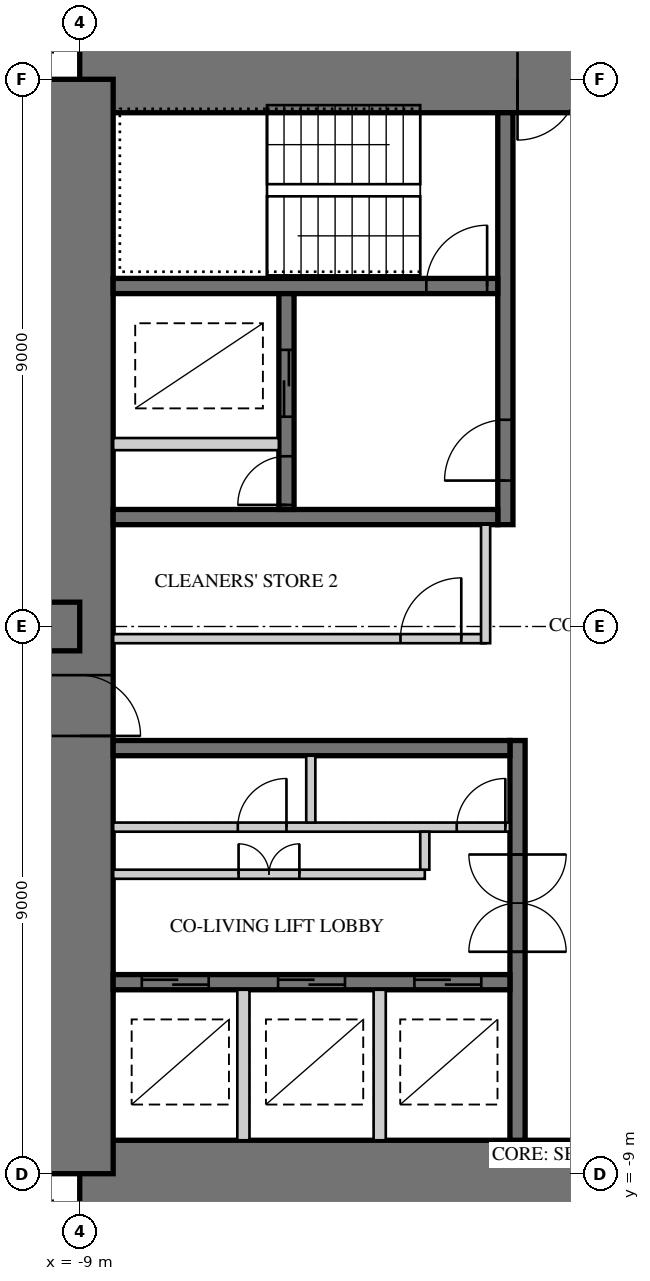
"""IFC4 building model, lengths in metres.
Left out: names, types, materials, properties, quantities, classifications, styles, units other than length and angle.
Written with IfcOpenShell. Run it as: python <this file> out.ifc"""

import sys

from ifc_helpers import new_model, si_unit, direction, frame, frame_2d, origin, place, context, subcontext, project, spatial, rectangle, extrude, element, fill, save


model = new_model("IFC4")
c1 = context("Model", 3, precision=1e-05, world=origin(), true_north=direction((0.0, 1.0)))
c2 = subcontext(c1, "Body", "Model", "MODEL_VIEW")
j1 = project(units=[si_unit("LENGTHUNIT", "METRE"), si_unit("PLANEANGLEUNIT", "RADIAN")], contexts=[c1])
p1 = place(None, origin())
s1 = spatial("IfcSite", under=j1, at=p1, CompositionType="ELEMENT")
p2 = place(p1, origin())
s2 = spatial("IfcBuilding", under=s1, at=p2, CompositionType="ELEMENT")
p3 = place(p2, frame((0.0, 0.0, 172.9)))
s3 = spatial("IfcBuildingStorey", under=s2, at=p3, CompositionType="ELEMENT", Elevation=172.9)
p4 = place(p3, frame((9.0, 9.0, 0.0), z_axis=(0.0, 0.0, 1.0), x_axis=(-1.0, 0.0, 0.0)))
e1 = element("IfcWall", 1, at=p4, inside=s3, PredefinedType="SHEAR", context=c2, shape_type="SweptSolid", body=[
    extrude(rectangle(XDim=18.0, YDim=1.1, at=frame_2d((9.0, 0.0))), origin(), (0.0, 0.0, 1.0), 3.4),
])
p5 = place(p4, frame((9.8, 0.0, 0.0)))
e2 = element("IfcOpeningElement", 2, at=p5, cuts=e1, PredefinedType="OPENING", context=c2, shape_type="SweptSolid", body=[
    extrude(rectangle(XDim=1.0, YDim=2.4, at=frame_2d((0.5, 1.2))), frame((0.0, 0.56, 0.0), z_axis=(0.0, -1.0, 0.0), x_axis=(1.0, 0.0, 0.0)), (0.0, 0.0, 1.0), 1.12),
])
p6 = place(p3, frame((-9.0, -9.0, 0.0), z_axis=(0.0, 0.0, 1.0), x_axis=(1.0, 0.0, 0.0)))
e3 = element("IfcWall", 3, at=p6, inside=s3, PredefinedType="SHEAR", context=c2, shape_type="SweptSolid", body=[
    extrude(rectangle(XDim=18.0, YDim=1.1, at=frame_2d((9.0, 0.0))), origin(), (0.0, 0.0, 1.0), 3.4),
])
p7 = place(p6, frame((9.8, 0.0, 0.0)))
e4 = element("IfcOpeningElement", 4, at=p7, cuts=e3, PredefinedType="OPENING", context=c2, shape_type="SweptSolid", body=[
    extrude(rectangle(XDim=1.0, YDim=2.4, at=frame_2d((0.5, 1.2))), frame((0.0, 0.56, 0.0), z_axis=(0.0, -1.0, 0.0), x_axis=(1.0, 0.0, 0.0)), (0.0, 0.0, 1.0), 1.12),
])
p8 = place(p3, frame((-9.0, 9.0, 0.0), z_axis=(0.0, 0.0, 1.0), x_axis=(0.0, -1.0, 0.0)))
e5 = element("IfcWall", 5, at=p8, inside=s3, PredefinedType="SHEAR", context=c2, shape_type="SweptSolid", body=[
    extrude(rectangle(XDim=18.0, YDim=1.1, at=frame_2d((9.0, 0.0))), origin(), (0.0, 0.0, 1.0), 3.4),
])
p9 = place(p8, frame((9.8, 0.0, 0.0)))
e6 = element("IfcOpeningElement", 6, at=p9, cuts=e5, PredefinedType="OPENING", context=c2, shape_type="SweptSolid", body=[
    extrude(rectangle(XDim=1.0, YDim=2.4, at=frame_2d((0.5, 1.2))), frame((0.0, 0.56, 0.0), z_axis=(0.0, -1.0, 0.0), x_axis=(1.0, 0.0, 0.0)), (0.0, 0.0, 1.0), 1.12),
])
p10 = place(p3, frame((-2.0, 1.675, 0.0), z_axis=(0.0, 0.0, 1.0), x_axis=(0.0, 1.0, 0.0)))
e7 = element("IfcWall", 7, at=p10, inside=s3, PredefinedType="SHEAR", context=c2, shape_type="SweptSolid", body=[
    extrude(rectangle(XDim=6.775, YDim=0.25, at=frame_2d((3.387, 0.0))), origin(), (0.0, 0.0, 1.0), 3.4),
])
p11 = place(p10, frame((0.725, 0.0, 0.0)))
e8 = element("IfcOpeningElement", 8, at=p11, cuts=e7, PredefinedType="OPENING", context=c2, shape_type="SweptSolid", body=[
    extrude(rectangle(XDim=1.0, YDim=2.1, at=frame_2d((0.5, 1.05))), frame((0.0, 0.135, 0.0), z_axis=(0.0, -1.0, 0.0), x_axis=(1.0, 0.0, 0.0)), (0.0, 0.0, 1.0), 0.27),
])
p12 = place(p3, frame((-2.125, 1.8, 0.0), z_axis=(0.0, 0.0, 1.0), x_axis=(-1.0, 0.0, 0.0)))
e9 = element("IfcWall", 9, at=p12, inside=s3, PredefinedType="SHEAR", context=c2, shape_type="SweptSolid", body=[
    extrude(rectangle(XDim=6.325, YDim=0.25, at=frame_2d((3.163, 0.0))), origin(), (0.0, 0.0, 1.0), 3.4),
])
p13 = place(p3, frame((-2.125, 5.6, 0.0), z_axis=(0.0, 0.0, 1.0), x_axis=(-1.0, 0.0, 0.0)))
e10 = element("IfcWall", 10, at=p13, inside=s3, PredefinedType="SHEAR", context=c2, shape_type="SweptSolid", body=[
    extrude(rectangle(XDim=6.325, YDim=0.25, at=frame_2d((3.163, 0.0))), origin(), (0.0, 0.0, 1.0), 3.4),
])
p14 = place(p13, frame((0.175, 0.0, 0.0)))
e11 = element("IfcOpeningElement", 11, at=p14, cuts=e10, PredefinedType="OPENING", context=c2, shape_type="SweptSolid", body=[
    extrude(rectangle(XDim=1.0, YDim=2.1, at=frame_2d((0.5, 1.05))), frame((0.0, 0.135, 0.0), z_axis=(0.0, -1.0, 0.0), x_axis=(1.0, 0.0, 0.0)), (0.0, 0.0, 1.0), 0.27),
])
p15 = place(p3, frame((-5.6, 1.925, 0.0), z_axis=(0.0, 0.0, 1.0), x_axis=(0.0, 1.0, 0.0)))
e12 = element("IfcWall", 12, at=p15, inside=s3, PredefinedType="SHEAR", context=c2, shape_type="SweptSolid", body=[
    extrude(rectangle(XDim=3.55, YDim=0.25, at=frame_2d((1.775, 0.0))), origin(), (0.0, 0.0, 1.0), 3.4),
])
p16 = place(p15, frame((1.525, 0.0, 0.0)))
e13 = element("IfcOpeningElement", 13, at=p16, cuts=e12, PredefinedType="OPENING", context=c2, shape_type="SweptSolid", body=[
    extrude(rectangle(XDim=1.1, YDim=2.2, at=frame_2d((0.55, 1.1))), frame((0.0, 0.135, 0.0), z_axis=(0.0, -1.0, 0.0), x_axis=(1.0, 0.0, 0.0)), (0.0, 0.0, 1.0), 0.27),
])
p17 = place(p15, frame((0.075, 0.0, 0.0)))
e14 = element("IfcOpeningElement", 14, at=p17, cuts=e12, PredefinedType="OPENING", context=c2, shape_type="SweptSolid", body=[
    extrude(rectangle(XDim=0.8, YDim=2.1, at=frame_2d((0.4, 1.05))), frame((0.0, 0.135, 0.0), z_axis=(0.0, -1.0, 0.0), x_axis=(1.0, 0.0, 0.0)), (0.0, 0.0, 1.0), 0.27),
])
p18 = place(p3, frame((-5.725, 3.0, 0.0), z_axis=(0.0, 0.0, 1.0), x_axis=(-1.0, 0.0, 0.0)))
e15 = element("IfcWall", 15, at=p18, inside=s3, PredefinedType="PARTITIONING", context=c2, shape_type="SweptSolid", body=[
    extrude(rectangle(XDim=2.725, YDim=0.2, at=frame_2d((1.362, 0.0))), origin(), (0.0, 0.0, 1.0), 3.4),
])
p19 = place(p3, frame((-1.8, -1.875, 0.0), z_axis=(0.0, 0.0, 1.0), x_axis=(0.0, -1.0, 0.0)))
e16 = element("IfcWall", 16, at=p19, inside=s3, PredefinedType="SHEAR", context=c2, shape_type="SweptSolid", body=[
    extrude(rectangle(XDim=6.575, YDim=0.25, at=frame_2d((3.288, 0.0))), origin(), (0.0, 0.0, 1.0), 3.4),
])
p20 = place(p19, frame((1.875, 0.0, 0.0)))
e17 = element("IfcOpeningElement", 17, at=p20, cuts=e16, PredefinedType="OPENING", context=c2, shape_type="SweptSolid", body=[
    extrude(rectangle(XDim=1.6, YDim=2.4, at=frame_2d((0.8, 1.2))), frame((0.0, 0.135, 0.0), z_axis=(0.0, -1.0, 0.0), x_axis=(1.0, 0.0, 0.0)), (0.0, 0.0, 1.0), 0.27),
])
p21 = place(p3, frame((-1.925, -2.0, 0.0), z_axis=(0.0, 0.0, 1.0), x_axis=(-1.0, 0.0, 0.0)))
e18 = element("IfcWall", 18, at=p21, inside=s3, PredefinedType="SHEAR", context=c2, shape_type="SweptSolid", body=[
    extrude(rectangle(XDim=6.525, YDim=0.25, at=frame_2d((3.262, 0.0))), origin(), (0.0, 0.0, 1.0), 3.4),
])
p22 = place(p3, frame((-1.925, -5.85, 0.0), z_axis=(0.0, 0.0, 1.0), x_axis=(-1.0, 0.0, 0.0)))
e19 = element("IfcWall", 19, at=p22, inside=s3, PredefinedType="SHEAR", context=c2, shape_type="SweptSolid", body=[
    extrude(rectangle(XDim=6.525, YDim=0.25, at=frame_2d((3.262, 0.0))), origin(), (0.0, 0.0, 1.0), 3.4),
])
p23 = place(p22, frame((0.471, 0.0, 0.0)))
e20 = element("IfcOpeningElement", 20, at=p23, cuts=e19, PredefinedType="OPENING", context=c2, shape_type="SweptSolid", body=[
    extrude(rectangle(XDim=1.1, YDim=2.2, at=frame_2d((0.55, 1.1))), frame((0.0, 0.135, 0.0), z_axis=(0.0, -1.0, 0.0), x_axis=(1.0, 0.0, 0.0)), (0.0, 0.0, 1.0), 0.27),
])
p24 = place(p22, frame((2.712, 0.0, 0.0)))
e21 = element("IfcOpeningElement", 21, at=p24, cuts=e19, PredefinedType="OPENING", context=c2, shape_type="SweptSolid", body=[
    extrude(rectangle(XDim=1.1, YDim=2.2, at=frame_2d((0.55, 1.1))), frame((0.0, 0.135, 0.0), z_axis=(0.0, -1.0, 0.0), x_axis=(1.0, 0.0, 0.0)), (0.0, 0.0, 1.0), 0.27),
])
p25 = place(p22, frame((4.954, 0.0, 0.0)))
e22 = element("IfcOpeningElement", 22, at=p25, cuts=e19, PredefinedType="OPENING", context=c2, shape_type="SweptSolid", body=[
    extrude(rectangle(XDim=1.1, YDim=2.2, at=frame_2d((0.55, 1.1))), frame((0.0, 0.135, 0.0), z_axis=(0.0, -1.0, 0.0), x_axis=(1.0, 0.0, 0.0)), (0.0, 0.0, 1.0), 0.27),
])
p26 = place(p3, frame((-1.925, -3.3, 0.0), z_axis=(0.0, 0.0, 1.0), x_axis=(-1.0, 0.0, 0.0)))
e23 = element("IfcWall", 23, at=p26, inside=s3, PredefinedType="PARTITIONING", context=c2, shape_type="SweptSolid", body=[
    extrude(rectangle(XDim=6.525, YDim=0.15, at=frame_2d((3.262, 0.0))), origin(), (0.0, 0.0, 1.0), 3.4),
])
p27 = place(p26, frame((0.075, 0.0, 0.0)))
e24 = element("IfcOpeningElement", 24, at=p27, cuts=e23, PredefinedType="OPENING", context=c2, shape_type="SweptSolid", body=[
    extrude(rectangle(XDim=0.8, YDim=2.1, at=frame_2d((0.4, 1.05))), frame((0.0, 0.085, 0.0), z_axis=(0.0, -1.0, 0.0), x_axis=(1.0, 0.0, 0.0)), (0.0, 0.0, 1.0), 0.17),
])
p28 = place(p26, frame((3.675, 0.0, 0.0)))
e25 = element("IfcOpeningElement", 25, at=p28, cuts=e23, PredefinedType="OPENING", context=c2, shape_type="SweptSolid", body=[
    extrude(rectangle(XDim=0.8, YDim=2.1, at=frame_2d((0.4, 1.05))), frame((0.0, 0.085, 0.0), z_axis=(0.0, -1.0, 0.0), x_axis=(1.0, 0.0, 0.0)), (0.0, 0.0, 1.0), 0.17),
])
p29 = place(p3, frame((-5.2, -2.125, 0.0), z_axis=(0.0, 0.0, 1.0), x_axis=(0.0, -1.0, 0.0)))
e26 = element("IfcWall", 26, at=p29, inside=s3, PredefinedType="PARTITIONING", context=c2, shape_type="SweptSolid", body=[
    extrude(rectangle(XDim=1.1, YDim=0.15, at=frame_2d((0.55, 0.0))), origin(), (0.0, 0.0, 1.0), 3.4),
])
for number, where, z_axis, x_axis in (
    (27, (-4.067, -5.975, 0.0), (0.0, 0.0, 1.0), (0.0, -1.0, 0.0)),
    (28, (-6.308, -5.975, 0.0), (0.0, 0.0, 1.0), (0.0, -1.0, 0.0)),
):
    element("IfcWall", number, at=place(p3, frame(where, z_axis=z_axis, x_axis=x_axis)), inside=s3, PredefinedType="PARTITIONING", context=c2, shape_type="SweptSolid", body=[
        extrude(rectangle(XDim=2.475, YDim=0.2, at=frame_2d((1.237, 0.0))), origin(), (0.0, 0.0, 1.0), 3.4),
    ])
p30 = place(p3, frame((-9.0, 0.0, 0.0), z_axis=(0.0, 0.0, 1.0), x_axis=(-1.0, 0.0, 0.0)))
e29 = element("IfcWall", 29, at=p30, inside=s3, PredefinedType="SHEAR", context=c2, shape_type="SweptSolid", body=[
    extrude(rectangle(XDim=18.0, YDim=0.8, at=frame_2d((9.0, 0.0))), origin(), (0.0, 0.0, 1.0), 3.4),
])
p31 = place(p30, frame((3.95, 0.0, 0.0)))
e30 = element("IfcOpeningElement", 30, at=p31, cuts=e29, PredefinedType="OPENING", context=c2, shape_type="SweptSolid", body=[
    extrude(rectangle(XDim=1.0, YDim=2.15, at=frame_2d((0.5, 1.075))), frame((0.0, 0.41, 0.0), z_axis=(0.0, -1.0, 0.0), x_axis=(1.0, 0.0, 0.0)), (0.0, 0.0, 1.0), 0.82),
])
p32 = place(p30, frame((6.6, 0.0, 0.0)))
e31 = element("IfcOpeningElement", 31, at=p32, cuts=e29, PredefinedType="OPENING", context=c2, shape_type="SweptSolid", body=[
    extrude(rectangle(XDim=1.0, YDim=2.15, at=frame_2d((0.5, 1.075))), frame((0.0, 0.41, 0.0), z_axis=(0.0, -1.0, 0.0), x_axis=(1.0, 0.0, 0.0)), (0.0, 0.0, 1.0), 0.82),
])
p33 = place(p30, frame((13.25, 0.0, 0.0)))
e32 = element("IfcOpeningElement", 32, at=p33, cuts=e29, PredefinedType="OPENING", context=c2, shape_type="SweptSolid", body=[
    extrude(rectangle(XDim=1.0, YDim=2.2, at=frame_2d((0.5, 1.1))), frame((0.0, 0.41, 0.0), z_axis=(0.0, -1.0, 0.0), x_axis=(1.0, 0.0, 0.0)), (0.0, 0.0, 1.0), 0.82),
])
p34 = place(p3, frame((-9.445, 9.57, 0.0), z_axis=(0.0, 0.0, 1.0), x_axis=(-1.0, 0.0, 0.0)))
e33 = element("IfcWall", 33, at=p34, inside=s3, PredefinedType="SOLIDWALL", context=c2, shape_type="SweptSolid", body=[
    extrude(rectangle(XDim=3.125, YDim=0.25, at=frame_2d((1.562, 0.0))), origin(), (0.0, 0.0, 1.0), 3.22),
])
p35 = place(p34, frame((0.6, 0.0, 0.0)))
e34 = element("IfcOpeningElement", 34, at=p35, cuts=e33, PredefinedType="OPENING", context=c2, shape_type="SweptSolid", body=[
    extrude(rectangle(XDim=1.0, YDim=2.2, at=frame_2d((0.5, 1.1))), frame((0.0, 0.135, 0.0), z_axis=(0.0, -1.0, 0.0), x_axis=(1.0, 0.0, 0.0)), (0.0, 0.0, 1.0), 0.27),
])
p36 = place(p3, frame((-9.57, -9.445, 0.0), z_axis=(0.0, 0.0, 1.0), x_axis=(0.0, -1.0, 0.0)))
e35 = element("IfcWall", 35, at=p36, inside=s3, PredefinedType="SOLIDWALL", context=c2, shape_type="SweptSolid", body=[
    extrude(rectangle(XDim=3.125, YDim=0.25, at=frame_2d((1.562, 0.0))), origin(), (0.0, 0.0, 1.0), 3.22),
])
p37 = place(p36, frame((0.6, 0.0, 0.0)))
e36 = element("IfcOpeningElement", 36, at=p37, cuts=e35, PredefinedType="OPENING", context=c2, shape_type="SweptSolid", body=[
    extrude(rectangle(XDim=1.0, YDim=2.2, at=frame_2d((0.5, 1.1))), frame((0.0, 0.135, 0.0), z_axis=(0.0, -1.0, 0.0), x_axis=(1.0, 0.0, 0.0)), (0.0, 0.0, 1.0), 0.27),
])
p38 = place(p3, frame((-2.325, -0.2, 0.0), z_axis=(0.0, 0.0, 1.0), x_axis=(-1.0, 0.0, 0.0)))
e37 = element("IfcWall", 37, at=p38, inside=s3, PredefinedType="PARTITIONING", context=c2, shape_type="SweptSolid", body=[
    extrude(rectangle(XDim=6.125, YDim=0.15, at=frame_2d((3.062, 0.0))), origin(), (0.0, 0.0, 1.0), 3.22),
])
p39 = place(p38, frame((0.4, 0.0, 0.0)))
e38 = element("IfcOpeningElement", 38, at=p39, cuts=e37, PredefinedType="OPENING", context=c2, shape_type="SweptSolid", body=[
    extrude(rectangle(XDim=1.0, YDim=2.1, at=frame_2d((0.5, 1.05))), frame((0.0, 0.085, 0.0), z_axis=(0.0, -1.0, 0.0), x_axis=(1.0, 0.0, 0.0)), (0.0, 0.0, 1.0), 0.17),
])
p40 = place(p3, frame((-2.325, 1.675, 0.0), z_axis=(0.0, 0.0, 1.0), x_axis=(0.0, -1.0, 0.0)))
e39 = element("IfcWall", 39, at=p40, inside=s3, PredefinedType="PARTITIONING", context=c2, shape_type="SweptSolid", body=[
    extrude(rectangle(XDim=1.95, YDim=0.15, at=frame_2d((0.975, 0.0))), origin(), (0.0, 0.0, 1.0), 3.22),
])
p41 = place(p3, frame((-3.325, -4.075, 0.0), z_axis=(0.0, 0.0, 1.0), x_axis=(-1.0, 0.0, 0.0)))
e40 = element("IfcWall", 40, at=p41, inside=s3, PredefinedType="PARTITIONING", context=c2, shape_type="SweptSolid", body=[
    extrude(rectangle(XDim=5.125, YDim=0.15, at=frame_2d((2.562, 0.0))), origin(), (0.0, 0.0, 1.0), 3.22),
])
p42 = place(p41, frame((2.062, 0.0, 0.0)))
e41 = element("IfcOpeningElement", 41, at=p42, cuts=e40, PredefinedType="OPENING", context=c2, shape_type="SweptSolid", body=[
    extrude(rectangle(XDim=1.0, YDim=2.1, at=frame_2d((0.5, 1.05))), frame((0.0, 0.085, 0.0), z_axis=(0.0, -1.0, 0.0), x_axis=(1.0, 0.0, 0.0)), (0.0, 0.0, 1.0), 0.17),
])
p43 = place(p3, frame((-3.325, -3.375, 0.0), z_axis=(0.0, 0.0, 1.0), x_axis=(0.0, -1.0, 0.0)))
e42 = element("IfcWall", 42, at=p43, inside=s3, PredefinedType="PARTITIONING", context=c2, shape_type="SweptSolid", body=[
    extrude(rectangle(XDim=0.625, YDim=0.15, at=frame_2d((0.312, 0.0))), origin(), (0.0, 0.0, 1.0), 3.22),
])
p44 = place(p39, frame((1.0, 0.0, 0.0), z_axis=(0.0, 0.0, 1.0), x_axis=(-1.0, 0.0, 0.0)))
e43 = element("IfcDoor", 43, at=p44, inside=s3, OperationType="SINGLE_SWING_RIGHT", PredefinedType="DOOR", context=c2, shape_type="SweptSolid", body=[
    extrude(rectangle(XDim=1.0, YDim=2.1, at=frame_2d((0.5, 1.05))), frame((0.0, 0.025, 0.0), z_axis=(0.0, -1.0, 0.0), x_axis=(1.0, 0.0, 0.0)), (0.0, 0.0, 1.0), 0.05),
])
fill(e38, e43)
p45 = place(p42, frame((1.0, 0.0, 0.0), z_axis=(0.0, 0.0, 1.0), x_axis=(-1.0, 0.0, 0.0)))
e44 = element("IfcDoor", 44, at=p45, inside=s3, OperationType="DOUBLE_DOOR_SINGLE_SWING", PredefinedType="DOOR", context=c2, shape_type="SweptSolid", body=[
    extrude(rectangle(XDim=1.0, YDim=2.1, at=frame_2d((0.5, 1.05))), frame((0.0, 0.025, 0.0), z_axis=(0.0, -1.0, 0.0), x_axis=(1.0, 0.0, 0.0)), (0.0, 0.0, 1.0), 0.05),
])
fill(e41, e44)
p46 = place(p5, origin())
e45 = element("IfcDoor", 45, at=p46, inside=s3, OperationType="SINGLE_SWING_RIGHT", PredefinedType="DOOR", context=c2, shape_type="SweptSolid", body=[
    extrude(rectangle(XDim=1.0, YDim=2.4, at=frame_2d((0.5, 1.2))), frame((0.0, 0.055, 0.0), z_axis=(0.0, -1.0, 0.0), x_axis=(1.0, 0.0, 0.0)), (0.0, 0.0, 1.0), 0.05),
])
fill(e2, e45)
p47 = place(p9, origin())
e46 = element("IfcDoor", 46, at=p47, inside=s3, OperationType="SINGLE_SWING_RIGHT", PredefinedType="DOOR", context=c2, shape_type="SweptSolid", body=[
    extrude(rectangle(XDim=1.0, YDim=2.4, at=frame_2d((0.5, 1.2))), frame((0.0, 0.055, 0.0), z_axis=(0.0, -1.0, 0.0), x_axis=(1.0, 0.0, 0.0)), (0.0, 0.0, 1.0), 0.05),
])
fill(e6, e46)
p48 = place(p11, origin())
e47 = element("IfcDoor", 47, at=p48, inside=s3, OperationType="SINGLE_SWING_LEFT", PredefinedType="DOOR", context=c2, shape_type="SweptSolid", body=[
    extrude(rectangle(XDim=1.0, YDim=2.1, at=frame_2d((0.5, 1.05))), frame((0.0, 0.025, 0.0), z_axis=(0.0, -1.0, 0.0), x_axis=(1.0, 0.0, 0.0)), (0.0, 0.0, 1.0), 0.05),
])
fill(e8, e47)
p49 = place(p14, frame((1.0, 0.0, 0.0), z_axis=(0.0, 0.0, 1.0), x_axis=(-1.0, 0.0, 0.0)))
e48 = element("IfcDoor", 48, at=p49, inside=s3, OperationType="SINGLE_SWING_RIGHT", PredefinedType="DOOR", context=c2, shape_type="SweptSolid", body=[
    extrude(rectangle(XDim=1.0, YDim=2.1, at=frame_2d((0.5, 1.05))), frame((0.0, 0.025, 0.0), z_axis=(0.0, -1.0, 0.0), x_axis=(1.0, 0.0, 0.0)), (0.0, 0.0, 1.0), 0.05),
])
fill(e11, e48)
p50 = place(p16, origin())
e49 = element("IfcDoor", 49, at=p50, inside=s3, OperationType="DOUBLE_DOOR_SLIDING", PredefinedType="DOOR", context=c2, shape_type="SweptSolid", body=[
    extrude(rectangle(XDim=1.1, YDim=2.2, at=frame_2d((0.55, 1.1))), frame((0.0, 0.025, 0.0), z_axis=(0.0, -1.0, 0.0), x_axis=(1.0, 0.0, 0.0)), (0.0, 0.0, 1.0), 0.05),
])
fill(e13, e49)
p51 = place(p17, origin())
e50 = element("IfcDoor", 50, at=p51, inside=s3, OperationType="SINGLE_SWING_LEFT", PredefinedType="DOOR", context=c2, shape_type="SweptSolid", body=[
    extrude(rectangle(XDim=0.8, YDim=2.1, at=frame_2d((0.4, 1.05))), frame((0.0, 0.025, 0.0), z_axis=(0.0, -1.0, 0.0), x_axis=(1.0, 0.0, 0.0)), (0.0, 0.0, 1.0), 0.05),
])
fill(e14, e50)
p52 = place(p23, origin())
e51 = element("IfcDoor", 51, at=p52, inside=s3, OperationType="DOUBLE_DOOR_SLIDING", PredefinedType="DOOR", context=c2, shape_type="SweptSolid", body=[
    extrude(rectangle(XDim=1.1, YDim=2.2, at=frame_2d((0.55, 1.1))), frame((0.0, 0.025, 0.0), z_axis=(0.0, -1.0, 0.0), x_axis=(1.0, 0.0, 0.0)), (0.0, 0.0, 1.0), 0.05),
])
fill(e20, e51)
p53 = place(p24, origin())
e52 = element("IfcDoor", 52, at=p53, inside=s3, OperationType="DOUBLE_DOOR_SLIDING", PredefinedType="DOOR", context=c2, shape_type="SweptSolid", body=[
    extrude(rectangle(XDim=1.1, YDim=2.2, at=frame_2d((0.55, 1.1))), frame((0.0, 0.025, 0.0), z_axis=(0.0, -1.0, 0.0), x_axis=(1.0, 0.0, 0.0)), (0.0, 0.0, 1.0), 0.05),
])
fill(e21, e52)
p54 = place(p25, origin())
e53 = element("IfcDoor", 53, at=p54, inside=s3, OperationType="DOUBLE_DOOR_SLIDING", PredefinedType="DOOR", context=c2, shape_type="SweptSolid", body=[
    extrude(rectangle(XDim=1.1, YDim=2.2, at=frame_2d((0.55, 1.1))), frame((0.0, 0.025, 0.0), z_axis=(0.0, -1.0, 0.0), x_axis=(1.0, 0.0, 0.0)), (0.0, 0.0, 1.0), 0.05),
])
fill(e22, e53)
p55 = place(p20, origin())
e54 = element("IfcDoor", 54, at=p55, inside=s3, OperationType="DOUBLE_DOOR_DOUBLE_SWING", PredefinedType="DOOR", context=c2, shape_type="SweptSolid", body=[
    extrude(rectangle(XDim=1.6, YDim=2.4, at=frame_2d((0.8, 1.2))), frame((0.0, 0.025, 0.0), z_axis=(0.0, -1.0, 0.0), x_axis=(1.0, 0.0, 0.0)), (0.0, 0.0, 1.0), 0.05),
])
fill(e17, e54)
p56 = place(p27, frame((0.8, 0.0, 0.0), z_axis=(0.0, 0.0, 1.0), x_axis=(-1.0, 0.0, 0.0)))
e55 = element("IfcDoor", 55, at=p56, inside=s3, OperationType="SINGLE_SWING_RIGHT", PredefinedType="DOOR", context=c2, shape_type="SweptSolid", body=[
    extrude(rectangle(XDim=0.8, YDim=2.1, at=frame_2d((0.4, 1.05))), frame((0.0, 0.025, 0.0), z_axis=(0.0, -1.0, 0.0), x_axis=(1.0, 0.0, 0.0)), (0.0, 0.0, 1.0), 0.05),
])
fill(e24, e55)
p57 = place(p28, frame((0.8, 0.0, 0.0), z_axis=(0.0, 0.0, 1.0), x_axis=(-1.0, 0.0, 0.0)))
e56 = element("IfcDoor", 56, at=p57, inside=s3, OperationType="SINGLE_SWING_RIGHT", PredefinedType="DOOR", context=c2, shape_type="SweptSolid", body=[
    extrude(rectangle(XDim=0.8, YDim=2.1, at=frame_2d((0.4, 1.05))), frame((0.0, 0.025, 0.0), z_axis=(0.0, -1.0, 0.0), x_axis=(1.0, 0.0, 0.0)), (0.0, 0.0, 1.0), 0.05),
])
fill(e25, e56)
save(model, sys.argv[1])
